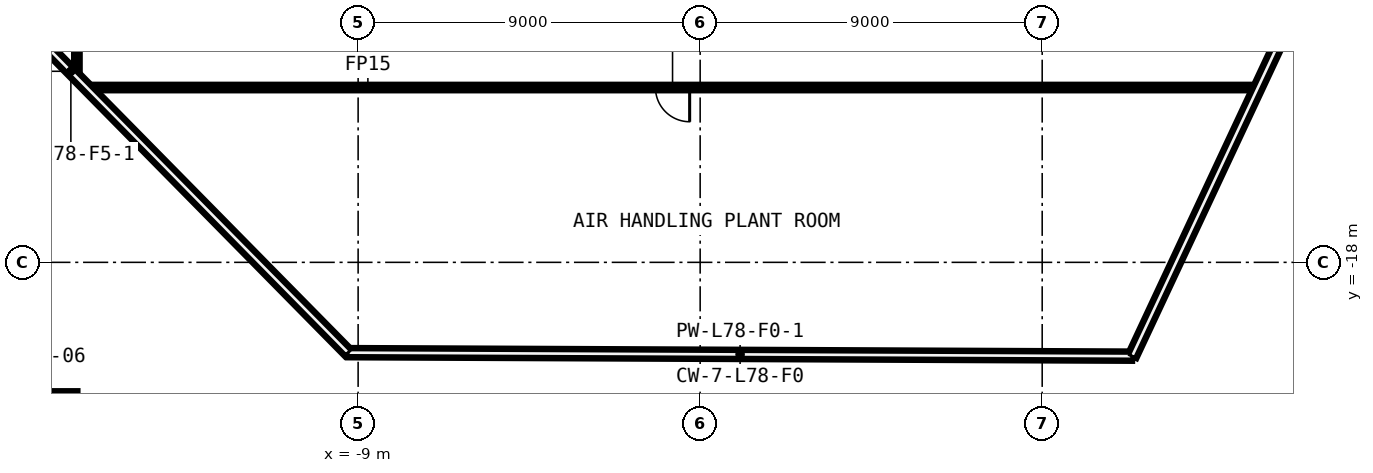
"""IFC4 building model, lengths in metres.
Left out: names, types, materials, properties, quantities, classifications, styles, units other than length and angle.
Written with IfcOpenShell. Run it as: python <this file> out.ifc"""

import sys

from ifc_helpers import new_model, si_unit, direction, frame, frame_2d, origin, origin_2d, place, context, subcontext, project, spatial, rectangle, hollow_rectangle, extrude, element, fill, save


model = new_model("IFC4")
c1 = context("Model", 3, precision=1e-05, world=origin(), true_north=direction((0.0, 1.0)))
c2 = subcontext(c1, "Body", "Model", "MODEL_VIEW")
j1 = project(units=[si_unit("LENGTHUNIT", "METRE"), si_unit("PLANEANGLEUNIT", "RADIAN")], contexts=[c1])
p1 = place(None, origin())
s1 = spatial("IfcSite", under=j1, at=p1, CompositionType="ELEMENT")
p2 = place(p1, origin())
s2 = spatial("IfcBuilding", under=s1, at=p2, CompositionType="ELEMENT")
p3 = place(p2, frame((0.0, 0.0, 363.2)))
s3 = spatial("IfcBuildingStorey", under=s2, at=p3, CompositionType="ELEMENT", Elevation=363.2)
p4 = place(p3, frame((-17.084, -22.089, 0.0), z_axis=(0.0, 0.0, 1.0), x_axis=(1.0, 0.0, 0.0)))
e1 = element("IfcColumn", 1, at=p4, inside=s3, PredefinedType="COLUMN", context=c2, shape_type="SweptSolid", body=[
    extrude(hollow_rectangle(XDim=1.4, YDim=1.4, WallThickness=0.06, at=origin_2d()), origin(), (0.0, 0.0, 1.0), 4.2),
])
p5 = place(p3, frame((14.656, -13.4, 0.0), z_axis=(0.0, 0.0, 1.0), x_axis=(-1.0, 0.0, 0.0)))
e2 = element("IfcWall", 2, at=p5, inside=s3, PredefinedType="PARTITIONING", context=c2, shape_type="SweptSolid", body=[
    extrude(rectangle(XDim=30.765, YDim=0.15, at=frame_2d((15.383, 0.0))), origin(), (0.0, 0.0, 1.0), 3.8),
])
p6 = place(p5, frame((14.933, 0.0, 0.0)))
e3 = element("IfcOpeningElement", 3, at=p6, cuts=e2, PredefinedType="OPENING", context=c2, shape_type="SweptSolid", body=[
    extrude(rectangle(XDim=0.9, YDim=2.1, at=frame_2d((0.45, 1.05))), frame((0.0, 0.085, 0.0), z_axis=(0.0, -1.0, 0.0), x_axis=(1.0, 0.0, 0.0)), (0.0, 0.0, 1.0), 0.17),
])
p7 = place(p3, frame((-16.4, -13.105, 0.0), z_axis=(0.0, 0.0, 1.0), x_axis=(0.0, 1.0, 0.0)))
e4 = element("IfcWall", 4, at=p7, inside=s3, PredefinedType="PARTITIONING", context=c2, shape_type="SweptSolid", body=[
    extrude(rectangle(XDim=22.641, YDim=0.15, at=frame_2d((11.321, 0.0))), origin(), (0.0, 0.0, 1.0), 3.8),
])
p8 = place(p7, frame((10.871, 0.0, 0.0)))
e5 = element("IfcOpeningElement", 5, at=p8, cuts=e4, PredefinedType="OPENING", context=c2, shape_type="SweptSolid", body=[
    extrude(rectangle(XDim=0.9, YDim=2.1, at=frame_2d((0.45, 1.05))), frame((0.0, 0.085, 0.0), z_axis=(0.0, -1.0, 0.0), x_axis=(1.0, 0.0, 0.0)), (0.0, 0.0, 1.0), 0.17),
])
p9 = place(p3, frame((-9.266, -20.377, 0.0), z_axis=(0.0, 0.0, 1.0), x_axis=(0.999990050783, -0.004460755013, 0.0)))
e6 = element("IfcWall", 6, at=p9, inside=s3, PredefinedType="SOLIDWALL", context=c2, shape_type="SweptSolid", body=[
    extrude(rectangle(XDim=20.634, YDim=0.25, at=frame_2d((10.317, 0.0))), origin(), (0.0, 0.0, 1.0), 3.8),
])
p10 = place(p3, frame((11.367, -20.469, 0.0), z_axis=(0.0, 0.0, 1.0), x_axis=(0.424125024155, 0.905603646131, 0.0)))
e7 = element("IfcWall", 7, at=p10, inside=s3, PredefinedType="SOLIDWALL", context=c2, shape_type="SweptSolid", body=[
    extrude(rectangle(XDim=28.801, YDim=0.25, at=frame_2d((14.401, 0.0))), origin(), (0.0, 0.0, 1.0), 3.8),
])
p11 = place(p3, frame((-23.851, -5.568, 0.0), z_axis=(0.0, 0.0, 1.0), x_axis=(0.701718568407, -0.712454244673, 0.0)))
e8 = element("IfcWall", 8, at=p11, inside=s3, PredefinedType="SOLIDWALL", context=c2, shape_type="SweptSolid", body=[
    extrude(rectangle(XDim=20.785, YDim=0.25, at=frame_2d((10.393, 0.0))), origin(), (0.0, 0.0, 1.0), 3.8),
])
p12 = place(p6, origin())
e9 = element("IfcDoor", 9, at=p12, inside=s3, OperationType="SINGLE_SWING_LEFT", PredefinedType="DOOR", context=c2, shape_type="SweptSolid", body=[
    extrude(rectangle(XDim=0.9, YDim=2.1, at=frame_2d((0.45, 1.05))), frame((0.0, 0.025, 0.0), z_axis=(0.0, -1.0, 0.0), x_axis=(1.0, 0.0, 0.0)), (0.0, 0.0, 1.0), 0.05),
])
fill(e3, e9)
save(model, sys.argv[1])
